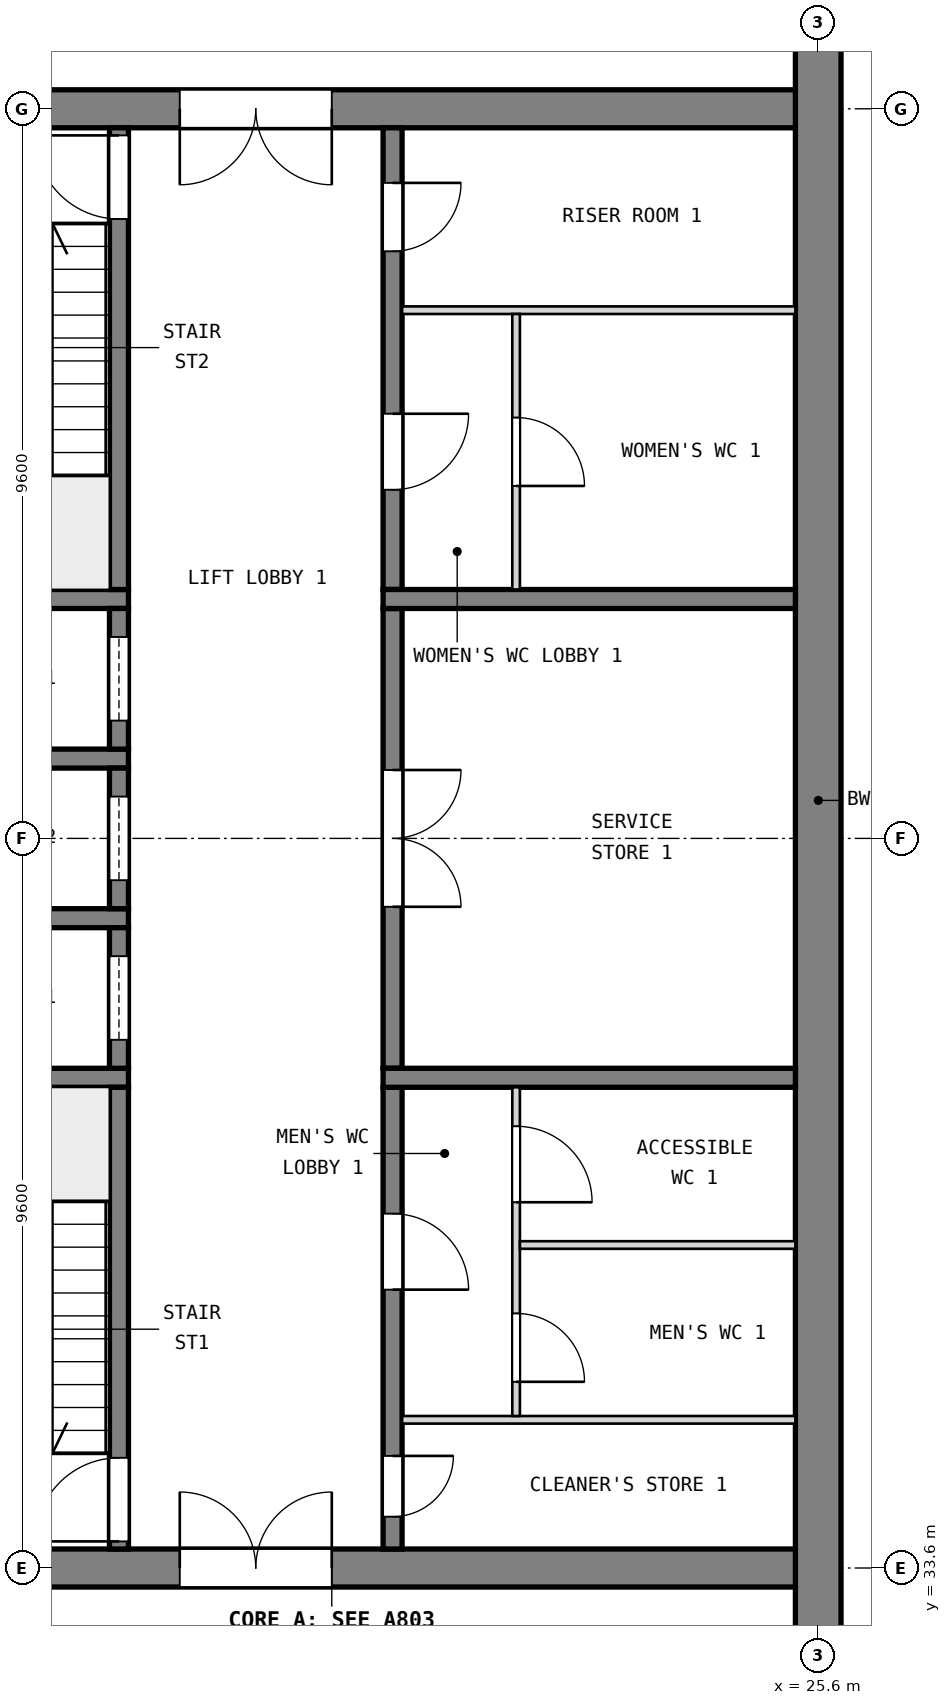
"""IFC4 building model, lengths in metres.
Left out: names, types, materials, properties, quantities, classifications, styles, units other than length and angle.
Written with IfcOpenShell. Run it as: python <this file> out.ifc"""

import sys

from ifc_helpers import new_model, si_unit, direction, frame, frame_2d, origin, place, context, subcontext, project, spatial, rectangle, extrude, element, fill, save


model = new_model("IFC4")
c1 = context("Model", 3, precision=1e-05, world=origin(), true_north=direction((0.0, 1.0)))
c2 = subcontext(c1, "Body", "Model", "MODEL_VIEW")
j1 = project(units=[si_unit("LENGTHUNIT", "METRE"), si_unit("PLANEANGLEUNIT", "RADIAN")], contexts=[c1])
p1 = place(None, origin())
s1 = spatial("IfcSite", under=j1, at=p1, CompositionType="ELEMENT")
p2 = place(p1, origin())
s2 = spatial("IfcBuilding", under=s1, at=p2, CompositionType="ELEMENT")
p3 = place(p2, frame((0.0, 0.0, 4.2)))
s3 = spatial("IfcBuildingStorey", under=s2, at=p3, CompositionType="ELEMENT", Elevation=4.2)
p4 = place(p3, frame((12.55, 52.8, 0.0), z_axis=(0.0, 0.0, 1.0), x_axis=(1.0, 0.0, 0.0)))
e1 = element("IfcWall", 1, at=p4, inside=s3, PredefinedType="SHEAR", context=c2, shape_type="SweptSolid", body=[
    extrude(rectangle(XDim=13.3, YDim=0.5, at=frame_2d((6.65, 0.0))), origin(), (0.0, 0.0, 1.0), 4.2),
])
p5 = place(p4, frame((4.65, 0.0, 0.0)))
e2 = element("IfcOpeningElement", 2, at=p5, cuts=e1, PredefinedType="OPENING", context=c2, shape_type="SweptSolid", body=[
    extrude(rectangle(XDim=2.0, YDim=2.1, at=frame_2d((1.0, 1.05))), frame((0.0, 0.26, 0.0), z_axis=(0.0, -1.0, 0.0), x_axis=(1.0, 0.0, 0.0)), (0.0, 0.0, 1.0), 0.52),
])
p6 = place(p3, frame((12.55, 33.6, 0.0), z_axis=(0.0, 0.0, 1.0), x_axis=(1.0, 0.0, 0.0)))
e3 = element("IfcWall", 3, at=p6, inside=s3, PredefinedType="SHEAR", context=c2, shape_type="SweptSolid", body=[
    extrude(rectangle(XDim=13.3, YDim=0.5, at=frame_2d((6.65, 0.0))), origin(), (0.0, 0.0, 1.0), 4.2),
])
p7 = place(p6, frame((4.65, 0.0, 0.0)))
e4 = element("IfcOpeningElement", 4, at=p7, cuts=e3, PredefinedType="OPENING", context=c2, shape_type="SweptSolid", body=[
    extrude(rectangle(XDim=2.0, YDim=2.1, at=frame_2d((1.0, 1.05))), frame((0.0, 0.26, 0.0), z_axis=(0.0, -1.0, 0.0), x_axis=(1.0, 0.0, 0.0)), (0.0, 0.0, 1.0), 0.52),
])
p8 = place(p3, frame((25.6, 28.8, 0.0), z_axis=(0.0, 0.0, 1.0), x_axis=(0.0, 1.0, 0.0)))
e5 = element("IfcWall", 5, at=p8, inside=s3, PredefinedType="SHEAR", context=c2, shape_type="SweptSolid", body=[
    extrude(rectangle(XDim=28.8, YDim=0.6, at=frame_2d((14.4, 0.0))), origin(), (0.0, 0.0, 1.0), 4.2),
])
for number, where, z_axis, x_axis in (
    (6, (13.05, 40.05, 0.0), (0.0, 0.0, 1.0), (1.0, 0.0, 0.0)),
    (7, (13.05, 42.15, 0.0), (0.0, 0.0, 1.0), (1.0, 0.0, 0.0)),
    (8, (13.05, 44.25, 0.0), (0.0, 0.0, 1.0), (1.0, 0.0, 0.0)),
    (9, (13.05, 46.35, 0.0), (0.0, 0.0, 1.0), (1.0, 0.0, 0.0)),
):
    element("IfcWall", number, at=place(p3, frame(where, z_axis=z_axis, x_axis=x_axis)), inside=s3, PredefinedType="SOLIDWALL", context=c2, shape_type="SweptSolid", body=[
        extrude(rectangle(XDim=3.475, YDim=0.25, at=frame_2d((1.737, 0.0))), origin(), (0.0, 0.0, 1.0), 3.9),
    ])
p9 = place(p3, frame((16.4, 33.85, 0.0), z_axis=(0.0, 0.0, 1.0), x_axis=(0.0, 1.0, 0.0)))
e10 = element("IfcWall", 10, at=p9, inside=s3, PredefinedType="SOLIDWALL", context=c2, shape_type="SweptSolid", body=[
    extrude(rectangle(XDim=6.075, YDim=0.25, at=frame_2d((3.038, 0.0))), origin(), (0.0, 0.0, 1.0), 3.9),
])
p10 = place(p9, frame((0.1, 0.0, 0.0)))
e11 = element("IfcOpeningElement", 11, at=p10, cuts=e10, PredefinedType="OPENING", context=c2, shape_type="SweptSolid", body=[
    extrude(rectangle(XDim=1.1, YDim=2.1, at=frame_2d((0.55, 1.05))), frame((0.0, 0.135, 0.0), z_axis=(0.0, -1.0, 0.0), x_axis=(1.0, 0.0, 0.0)), (0.0, 0.0, 1.0), 0.27),
])
p11 = place(p3, frame((16.4, 40.175, 0.0), z_axis=(0.0, 0.0, 1.0), x_axis=(0.0, 1.0, 0.0)))
e12 = element("IfcWall", 12, at=p11, inside=s3, PredefinedType="SOLIDWALL", context=c2, shape_type="SweptSolid", body=[
    extrude(rectangle(XDim=1.85, YDim=0.25, at=frame_2d((0.925, 0.0))), origin(), (0.0, 0.0, 1.0), 3.9),
])
p12 = place(p11, frame((0.375, 0.0, 0.0)))
e13 = element("IfcOpeningElement", 13, at=p12, cuts=e12, PredefinedType="OPENING", context=c2, shape_type="SweptSolid", body=[
    extrude(rectangle(XDim=1.1, YDim=2.1, at=frame_2d((0.55, 1.05))), frame((0.0, 0.135, 0.0), z_axis=(0.0, -1.0, 0.0), x_axis=(1.0, 0.0, 0.0)), (0.0, 0.0, 1.0), 0.27),
])
p13 = place(p3, frame((16.4, 42.275, 0.0), z_axis=(0.0, 0.0, 1.0), x_axis=(0.0, 1.0, 0.0)))
e14 = element("IfcWall", 14, at=p13, inside=s3, PredefinedType="SOLIDWALL", context=c2, shape_type="SweptSolid", body=[
    extrude(rectangle(XDim=1.85, YDim=0.25, at=frame_2d((0.925, 0.0))), origin(), (0.0, 0.0, 1.0), 3.9),
])
p14 = place(p13, frame((0.375, 0.0, 0.0)))
e15 = element("IfcOpeningElement", 15, at=p14, cuts=e14, PredefinedType="OPENING", context=c2, shape_type="SweptSolid", body=[
    extrude(rectangle(XDim=1.1, YDim=2.1, at=frame_2d((0.55, 1.05))), frame((0.0, 0.135, 0.0), z_axis=(0.0, -1.0, 0.0), x_axis=(1.0, 0.0, 0.0)), (0.0, 0.0, 1.0), 0.27),
])
p15 = place(p3, frame((16.4, 44.375, 0.0), z_axis=(0.0, 0.0, 1.0), x_axis=(0.0, 1.0, 0.0)))
e16 = element("IfcWall", 16, at=p15, inside=s3, PredefinedType="SOLIDWALL", context=c2, shape_type="SweptSolid", body=[
    extrude(rectangle(XDim=1.85, YDim=0.25, at=frame_2d((0.925, 0.0))), origin(), (0.0, 0.0, 1.0), 3.9),
])
p16 = place(p15, frame((0.375, 0.0, 0.0)))
e17 = element("IfcOpeningElement", 17, at=p16, cuts=e16, PredefinedType="OPENING", context=c2, shape_type="SweptSolid", body=[
    extrude(rectangle(XDim=1.1, YDim=2.1, at=frame_2d((0.55, 1.05))), frame((0.0, 0.135, 0.0), z_axis=(0.0, -1.0, 0.0), x_axis=(1.0, 0.0, 0.0)), (0.0, 0.0, 1.0), 0.27),
])
p17 = place(p3, frame((16.4, 46.475, 0.0), z_axis=(0.0, 0.0, 1.0), x_axis=(0.0, 1.0, 0.0)))
e18 = element("IfcWall", 18, at=p17, inside=s3, PredefinedType="SOLIDWALL", context=c2, shape_type="SweptSolid", body=[
    extrude(rectangle(XDim=6.075, YDim=0.25, at=frame_2d((3.038, 0.0))), origin(), (0.0, 0.0, 1.0), 3.9),
])
p18 = place(p17, frame((4.875, 0.0, 0.0)))
e19 = element("IfcOpeningElement", 19, at=p18, cuts=e18, PredefinedType="OPENING", context=c2, shape_type="SweptSolid", body=[
    extrude(rectangle(XDim=1.1, YDim=2.1, at=frame_2d((0.55, 1.05))), frame((0.0, 0.135, 0.0), z_axis=(0.0, -1.0, 0.0), x_axis=(1.0, 0.0, 0.0)), (0.0, 0.0, 1.0), 0.27),
])
p19 = place(p3, frame((20.0, 33.85, 0.0), z_axis=(0.0, 0.0, 1.0), x_axis=(0.0, 1.0, 0.0)))
e20 = element("IfcWall", 20, at=p19, inside=s3, PredefinedType="SOLIDWALL", context=c2, shape_type="SweptSolid", body=[
    extrude(rectangle(XDim=6.075, YDim=0.25, at=frame_2d((3.038, 0.0))), origin(), (0.0, 0.0, 1.0), 3.9),
])
p20 = place(p19, frame((0.425, 0.0, 0.0)))
e21 = element("IfcOpeningElement", 21, at=p20, cuts=e20, PredefinedType="OPENING", context=c2, shape_type="SweptSolid", body=[
    extrude(rectangle(XDim=0.8, YDim=2.1, at=frame_2d((0.4, 1.05))), frame((0.0, 0.135, 0.0), z_axis=(0.0, -1.0, 0.0), x_axis=(1.0, 0.0, 0.0)), (0.0, 0.0, 1.0), 0.27),
])
p21 = place(p19, frame((3.413, 0.0, 0.0)))
e22 = element("IfcOpeningElement", 22, at=p21, cuts=e20, PredefinedType="OPENING", context=c2, shape_type="SweptSolid", body=[
    extrude(rectangle(XDim=1.0, YDim=2.1, at=frame_2d((0.5, 1.05))), frame((0.0, 0.135, 0.0), z_axis=(0.0, -1.0, 0.0), x_axis=(1.0, 0.0, 0.0)), (0.0, 0.0, 1.0), 0.27),
])
p22 = place(p3, frame((20.0, 40.175, 0.0), z_axis=(0.0, 0.0, 1.0), x_axis=(0.0, 1.0, 0.0)))
e23 = element("IfcWall", 23, at=p22, inside=s3, PredefinedType="SOLIDWALL", context=c2, shape_type="SweptSolid", body=[
    extrude(rectangle(XDim=6.05, YDim=0.25, at=frame_2d((3.025, 0.0))), origin(), (0.0, 0.0, 1.0), 3.9),
])
p23 = place(p22, frame((2.125, 0.0, 0.0)))
e24 = element("IfcOpeningElement", 24, at=p23, cuts=e23, PredefinedType="OPENING", context=c2, shape_type="SweptSolid", body=[
    extrude(rectangle(XDim=1.8, YDim=2.1, at=frame_2d((0.9, 1.05))), frame((0.0, 0.135, 0.0), z_axis=(0.0, -1.0, 0.0), x_axis=(1.0, 0.0, 0.0)), (0.0, 0.0, 1.0), 0.27),
])
p24 = place(p3, frame((20.0, 46.475, 0.0), z_axis=(0.0, 0.0, 1.0), x_axis=(0.0, 1.0, 0.0)))
e25 = element("IfcWall", 25, at=p24, inside=s3, PredefinedType="SOLIDWALL", context=c2, shape_type="SweptSolid", body=[
    extrude(rectangle(XDim=6.075, YDim=0.25, at=frame_2d((3.038, 0.0))), origin(), (0.0, 0.0, 1.0), 3.9),
])
p25 = place(p24, frame((1.312, 0.0, 0.0)))
e26 = element("IfcOpeningElement", 26, at=p25, cuts=e25, PredefinedType="OPENING", context=c2, shape_type="SweptSolid", body=[
    extrude(rectangle(XDim=1.0, YDim=2.1, at=frame_2d((0.5, 1.05))), frame((0.0, 0.135, 0.0), z_axis=(0.0, -1.0, 0.0), x_axis=(1.0, 0.0, 0.0)), (0.0, 0.0, 1.0), 0.27),
])
p26 = place(p24, frame((4.45, 0.0, 0.0)))
e27 = element("IfcOpeningElement", 27, at=p26, cuts=e25, PredefinedType="OPENING", context=c2, shape_type="SweptSolid", body=[
    extrude(rectangle(XDim=0.9, YDim=2.1, at=frame_2d((0.45, 1.05))), frame((0.0, 0.135, 0.0), z_axis=(0.0, -1.0, 0.0), x_axis=(1.0, 0.0, 0.0)), (0.0, 0.0, 1.0), 0.27),
])
for number, where, z_axis, x_axis in (
    (28, (19.875, 40.05, 0.0), (0.0, 0.0, 1.0), (1.0, 0.0, 0.0)),
    (29, (19.875, 46.35, 0.0), (0.0, 0.0, 1.0), (1.0, 0.0, 0.0)),
):
    element("IfcWall", number, at=place(p3, frame(where, z_axis=z_axis, x_axis=x_axis)), inside=s3, PredefinedType="SOLIDWALL", context=c2, shape_type="SweptSolid", body=[
        extrude(rectangle(XDim=5.425, YDim=0.25, at=frame_2d((2.712, 0.0))), origin(), (0.0, 0.0, 1.0), 3.9),
    ])
p27 = place(p3, frame((20.125, 35.55, 0.0), z_axis=(0.0, 0.0, 1.0), x_axis=(1.0, 0.0, 0.0)))
e30 = element("IfcWall", 30, at=p27, inside=s3, PredefinedType="PARTITIONING", context=c2, shape_type="SweptSolid", body=[
    extrude(rectangle(XDim=5.175, YDim=0.1, at=frame_2d((2.587, 0.0))), origin(), (0.0, 0.0, 1.0), 3.9),
])
p28 = place(p3, frame((21.625, 35.6, 0.0), z_axis=(0.0, 0.0, 1.0), x_axis=(0.0, 1.0, 0.0)))
e31 = element("IfcWall", 31, at=p28, inside=s3, PredefinedType="PARTITIONING", context=c2, shape_type="SweptSolid", body=[
    extrude(rectangle(XDim=4.325, YDim=0.1, at=frame_2d((2.163, 0.0))), origin(), (0.0, 0.0, 1.0), 3.9),
])
p29 = place(p28, frame((0.45, 0.0, 0.0)))
e32 = element("IfcOpeningElement", 32, at=p29, cuts=e31, PredefinedType="OPENING", context=c2, shape_type="SweptSolid", body=[
    extrude(rectangle(XDim=0.9, YDim=2.1, at=frame_2d((0.45, 1.05))), frame((0.0, 0.06, 0.0), z_axis=(0.0, -1.0, 0.0), x_axis=(1.0, 0.0, 0.0)), (0.0, 0.0, 1.0), 0.12),
])
p30 = place(p28, frame((2.812, 0.0, 0.0)))
e33 = element("IfcOpeningElement", 33, at=p30, cuts=e31, PredefinedType="OPENING", context=c2, shape_type="SweptSolid", body=[
    extrude(rectangle(XDim=1.0, YDim=2.1, at=frame_2d((0.5, 1.05))), frame((0.0, 0.06, 0.0), z_axis=(0.0, -1.0, 0.0), x_axis=(1.0, 0.0, 0.0)), (0.0, 0.0, 1.0), 0.12),
])
p31 = place(p3, frame((21.675, 37.85, 0.0), z_axis=(0.0, 0.0, 1.0), x_axis=(1.0, 0.0, 0.0)))
e34 = element("IfcWall", 34, at=p31, inside=s3, PredefinedType="PARTITIONING", context=c2, shape_type="SweptSolid", body=[
    extrude(rectangle(XDim=3.625, YDim=0.1, at=frame_2d((1.812, 0.0))), origin(), (0.0, 0.0, 1.0), 3.9),
])
p32 = place(p3, frame((20.125, 50.15, 0.0), z_axis=(0.0, 0.0, 1.0), x_axis=(1.0, 0.0, 0.0)))
e35 = element("IfcWall", 35, at=p32, inside=s3, PredefinedType="PARTITIONING", context=c2, shape_type="SweptSolid", body=[
    extrude(rectangle(XDim=5.175, YDim=0.1, at=frame_2d((2.587, 0.0))), origin(), (0.0, 0.0, 1.0), 3.9),
])
p33 = place(p3, frame((21.625, 46.475, 0.0), z_axis=(0.0, 0.0, 1.0), x_axis=(0.0, 1.0, 0.0)))
e36 = element("IfcWall", 36, at=p33, inside=s3, PredefinedType="PARTITIONING", context=c2, shape_type="SweptSolid", body=[
    extrude(rectangle(XDim=3.625, YDim=0.1, at=frame_2d((1.812, 0.0))), origin(), (0.0, 0.0, 1.0), 3.9),
])
p34 = place(p33, frame((1.363, 0.0, 0.0)))
e37 = element("IfcOpeningElement", 37, at=p34, cuts=e36, PredefinedType="OPENING", context=c2, shape_type="SweptSolid", body=[
    extrude(rectangle(XDim=0.9, YDim=2.1, at=frame_2d((0.45, 1.05))), frame((0.0, 0.06, 0.0), z_axis=(0.0, -1.0, 0.0), x_axis=(1.0, 0.0, 0.0)), (0.0, 0.0, 1.0), 0.12),
])
p35 = place(p10, origin())
e38 = element("IfcDoor", 38, at=p35, inside=s3, OperationType="SINGLE_SWING_LEFT", PredefinedType="DOOR", context=c2, shape_type="SweptSolid", body=[
    extrude(rectangle(XDim=1.1, YDim=2.1, at=frame_2d((0.55, 1.05))), frame((0.0, 0.025, 0.0), z_axis=(0.0, -1.0, 0.0), x_axis=(1.0, 0.0, 0.0)), (0.0, 0.0, 1.0), 0.05),
])
fill(e11, e38)
p36 = place(p18, origin())
e39 = element("IfcDoor", 39, at=p36, inside=s3, OperationType="SINGLE_SWING_RIGHT", PredefinedType="DOOR", context=c2, shape_type="SweptSolid", body=[
    extrude(rectangle(XDim=1.1, YDim=2.1, at=frame_2d((0.55, 1.05))), frame((0.0, 0.025, 0.0), z_axis=(0.0, -1.0, 0.0), x_axis=(1.0, 0.0, 0.0)), (0.0, 0.0, 1.0), 0.05),
])
fill(e19, e39)
p37 = place(p12, origin())
e40 = element("IfcDoor", 40, at=p37, inside=s3, OperationType="SLIDING_TO_LEFT", PredefinedType="DOOR", context=c2, shape_type="SweptSolid", body=[
    extrude(rectangle(XDim=1.1, YDim=2.1, at=frame_2d((0.55, 1.05))), frame((0.0, 0.025, 0.0), z_axis=(0.0, -1.0, 0.0), x_axis=(1.0, 0.0, 0.0)), (0.0, 0.0, 1.0), 0.05),
])
fill(e13, e40)
p38 = place(p14, origin())
e41 = element("IfcDoor", 41, at=p38, inside=s3, OperationType="SLIDING_TO_LEFT", PredefinedType="DOOR", context=c2, shape_type="SweptSolid", body=[
    extrude(rectangle(XDim=1.1, YDim=2.1, at=frame_2d((0.55, 1.05))), frame((0.0, 0.025, 0.0), z_axis=(0.0, -1.0, 0.0), x_axis=(1.0, 0.0, 0.0)), (0.0, 0.0, 1.0), 0.05),
])
fill(e15, e41)
p39 = place(p16, origin())
e42 = element("IfcDoor", 42, at=p39, inside=s3, OperationType="SLIDING_TO_LEFT", PredefinedType="DOOR", context=c2, shape_type="SweptSolid", body=[
    extrude(rectangle(XDim=1.1, YDim=2.1, at=frame_2d((0.55, 1.05))), frame((0.0, 0.025, 0.0), z_axis=(0.0, -1.0, 0.0), x_axis=(1.0, 0.0, 0.0)), (0.0, 0.0, 1.0), 0.05),
])
fill(e17, e42)
p40 = place(p23, frame((1.8, 0.0, 0.0), z_axis=(0.0, 0.0, 1.0), x_axis=(-1.0, 0.0, 0.0)))
e43 = element("IfcDoor", 43, at=p40, inside=s3, OperationType="DOUBLE_DOOR_SINGLE_SWING", PredefinedType="DOOR", context=c2, shape_type="SweptSolid", body=[
    extrude(rectangle(XDim=1.8, YDim=2.1, at=frame_2d((0.9, 1.05))), frame((0.0, 0.025, 0.0), z_axis=(0.0, -1.0, 0.0), x_axis=(1.0, 0.0, 0.0)), (0.0, 0.0, 1.0), 0.05),
])
fill(e24, e43)
p41 = place(p20, frame((0.8, 0.0, 0.0), z_axis=(0.0, 0.0, 1.0), x_axis=(-1.0, 0.0, 0.0)))
e44 = element("IfcDoor", 44, at=p41, inside=s3, OperationType="SINGLE_SWING_LEFT", PredefinedType="DOOR", context=c2, shape_type="SweptSolid", body=[
    extrude(rectangle(XDim=0.8, YDim=2.1, at=frame_2d((0.4, 1.05))), frame((0.0, 0.025, 0.0), z_axis=(0.0, -1.0, 0.0), x_axis=(1.0, 0.0, 0.0)), (0.0, 0.0, 1.0), 0.05),
])
fill(e21, e44)
p42 = place(p21, frame((1.0, 0.0, 0.0), z_axis=(0.0, 0.0, 1.0), x_axis=(-1.0, 0.0, 0.0)))
e45 = element("IfcDoor", 45, at=p42, inside=s3, OperationType="SINGLE_SWING_RIGHT", PredefinedType="DOOR", context=c2, shape_type="SweptSolid", body=[
    extrude(rectangle(XDim=1.0, YDim=2.1, at=frame_2d((0.5, 1.05))), frame((0.0, 0.025, 0.0), z_axis=(0.0, -1.0, 0.0), x_axis=(1.0, 0.0, 0.0)), (0.0, 0.0, 1.0), 0.05),
])
fill(e22, e45)
p43 = place(p29, frame((0.9, 0.0, 0.0), z_axis=(0.0, 0.0, 1.0), x_axis=(-1.0, 0.0, 0.0)))
e46 = element("IfcDoor", 46, at=p43, inside=s3, OperationType="SINGLE_SWING_RIGHT", PredefinedType="DOOR", context=c2, shape_type="SweptSolid", body=[
    extrude(rectangle(XDim=0.9, YDim=2.1, at=frame_2d((0.45, 1.05))), frame((0.0, 0.025, 0.0), z_axis=(0.0, -1.0, 0.0), x_axis=(1.0, 0.0, 0.0)), (0.0, 0.0, 1.0), 0.05),
])
fill(e32, e46)
p44 = place(p30, frame((1.0, 0.0, 0.0), z_axis=(0.0, 0.0, 1.0), x_axis=(-1.0, 0.0, 0.0)))
e47 = element("IfcDoor", 47, at=p44, inside=s3, OperationType="SINGLE_SWING_RIGHT", PredefinedType="DOOR", context=c2, shape_type="SweptSolid", body=[
    extrude(rectangle(XDim=1.0, YDim=2.1, at=frame_2d((0.5, 1.05))), frame((0.0, 0.025, 0.0), z_axis=(0.0, -1.0, 0.0), x_axis=(1.0, 0.0, 0.0)), (0.0, 0.0, 1.0), 0.05),
])
fill(e33, e47)
p45 = place(p25, frame((1.0, 0.0, 0.0), z_axis=(0.0, 0.0, 1.0), x_axis=(-1.0, 0.0, 0.0)))
e48 = element("IfcDoor", 48, at=p45, inside=s3, OperationType="SINGLE_SWING_LEFT", PredefinedType="DOOR", context=c2, shape_type="SweptSolid", body=[
    extrude(rectangle(XDim=1.0, YDim=2.1, at=frame_2d((0.5, 1.05))), frame((0.0, 0.025, 0.0), z_axis=(0.0, -1.0, 0.0), x_axis=(1.0, 0.0, 0.0)), (0.0, 0.0, 1.0), 0.05),
])
fill(e26, e48)
p46 = place(p34, frame((0.9, 0.0, 0.0), z_axis=(0.0, 0.0, 1.0), x_axis=(-1.0, 0.0, 0.0)))
e49 = element("IfcDoor", 49, at=p46, inside=s3, OperationType="SINGLE_SWING_RIGHT", PredefinedType="DOOR", context=c2, shape_type="SweptSolid", body=[
    extrude(rectangle(XDim=0.9, YDim=2.1, at=frame_2d((0.45, 1.05))), frame((0.0, 0.025, 0.0), z_axis=(0.0, -1.0, 0.0), x_axis=(1.0, 0.0, 0.0)), (0.0, 0.0, 1.0), 0.05),
])
fill(e37, e49)
p47 = place(p26, frame((0.9, 0.0, 0.0), z_axis=(0.0, 0.0, 1.0), x_axis=(-1.0, 0.0, 0.0)))
e50 = element("IfcDoor", 50, at=p47, inside=s3, OperationType="SINGLE_SWING_LEFT", PredefinedType="DOOR", context=c2, shape_type="SweptSolid", body=[
    extrude(rectangle(XDim=0.9, YDim=2.1, at=frame_2d((0.45, 1.05))), frame((0.0, 0.025, 0.0), z_axis=(0.0, -1.0, 0.0), x_axis=(1.0, 0.0, 0.0)), (0.0, 0.0, 1.0), 0.05),
])
fill(e27, e50)
p48 = place(p7, origin())
e51 = element("IfcDoor", 51, at=p48, inside=s3, OperationType="DOUBLE_DOOR_SINGLE_SWING", PredefinedType="DOOR", context=c2, shape_type="SweptSolid", body=[
    extrude(rectangle(XDim=2.0, YDim=2.1, at=frame_2d((1.0, 1.05))), frame((0.0, 0.025, 0.0), z_axis=(0.0, -1.0, 0.0), x_axis=(1.0, 0.0, 0.0)), (0.0, 0.0, 1.0), 0.05),
])
fill(e4, e51)
p49 = place(p5, frame((2.0, 0.0, 0.0), z_axis=(0.0, 0.0, 1.0), x_axis=(-1.0, 0.0, 0.0)))
e52 = element("IfcDoor", 52, at=p49, inside=s3, OperationType="DOUBLE_DOOR_SINGLE_SWING", PredefinedType="DOOR", context=c2, shape_type="SweptSolid", body=[
    extrude(rectangle(XDim=2.0, YDim=2.1, at=frame_2d((1.0, 1.05))), frame((0.0, 0.025, 0.0), z_axis=(0.0, -1.0, 0.0), x_axis=(1.0, 0.0, 0.0)), (0.0, 0.0, 1.0), 0.05),
])
fill(e2, e52)
save(model, sys.argv[1])
